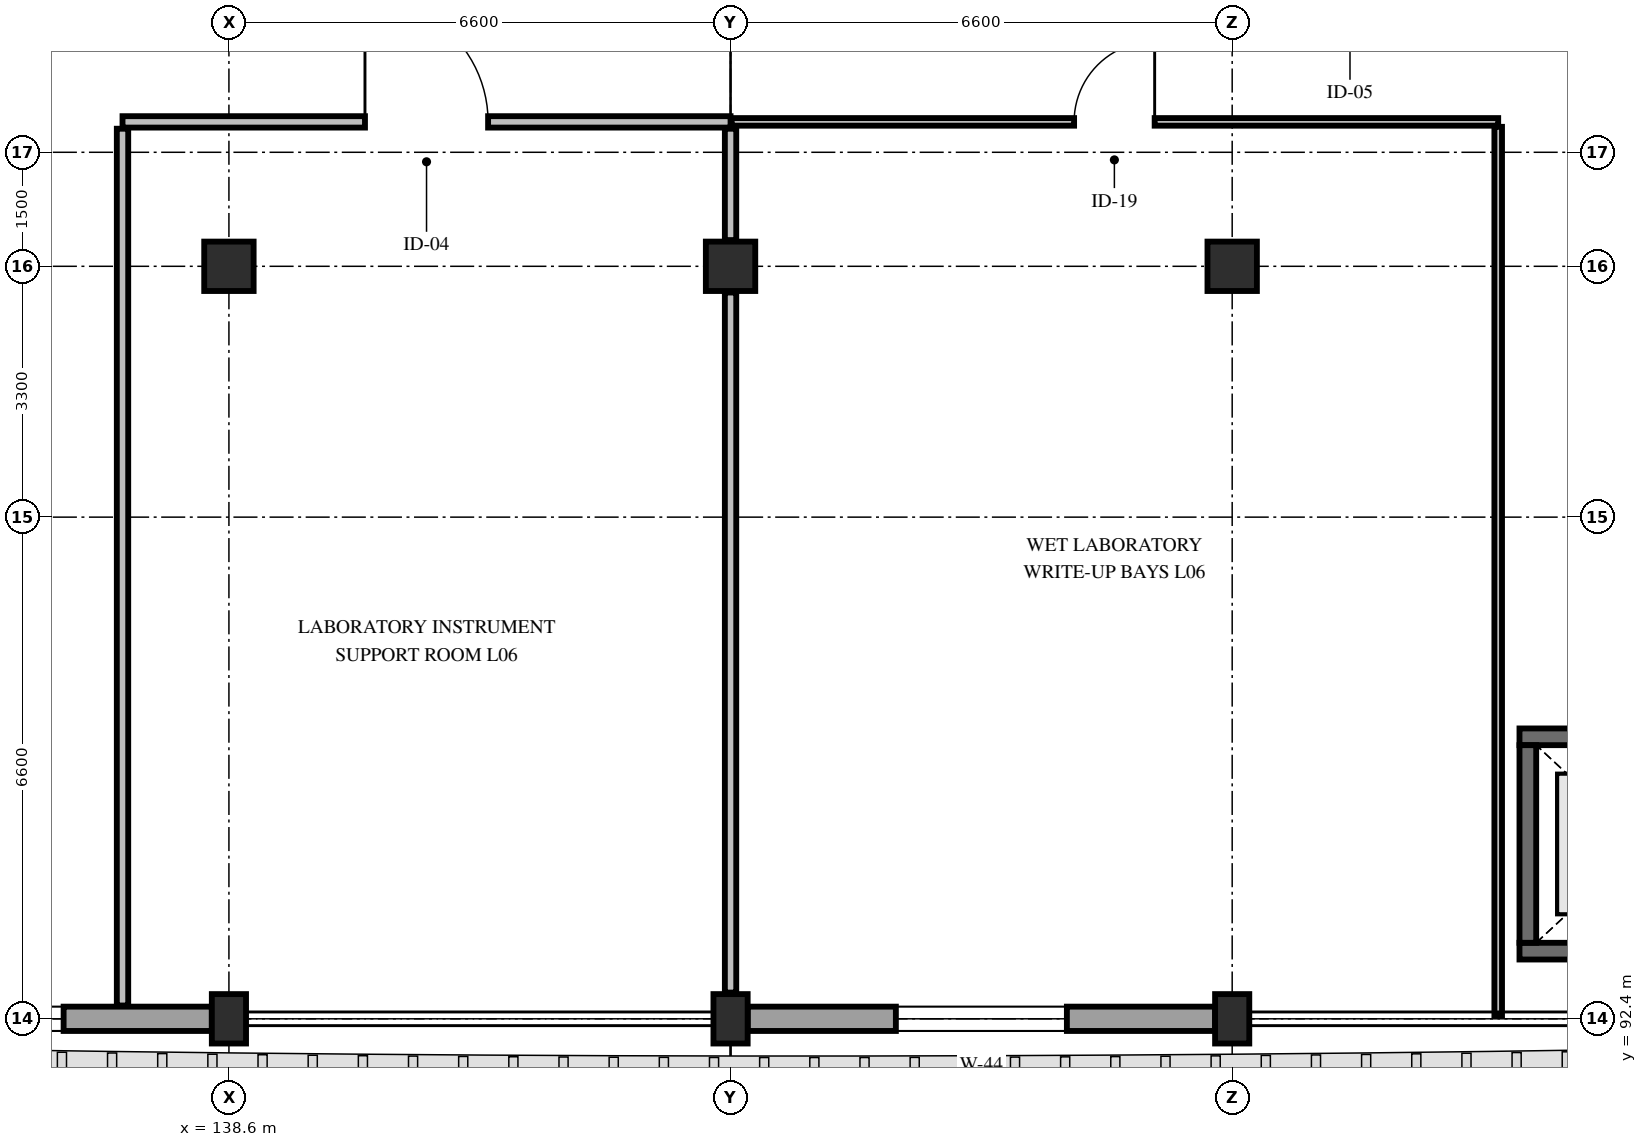
"""IFC4 building model, lengths in metres.
Left out: names, types, materials, properties, quantities, classifications, styles, units other than length and angle.
Written with IfcOpenShell. Run it as: python <this file> out.ifc"""

import sys

from ifc_helpers import new_model, si_unit, direction, frame, frame_2d, origin, origin_2d, place, context, subcontext, project, spatial, rectangle, extrude, element, fill, save


model = new_model("IFC4")
c1 = context("Model", 3, precision=1e-05, world=origin(), true_north=direction((0.0, 1.0)))
c2 = subcontext(c1, "Body", "Model", "MODEL_VIEW")
j1 = project(units=[si_unit("LENGTHUNIT", "METRE"), si_unit("PLANEANGLEUNIT", "RADIAN")], contexts=[c1])
p1 = place(None, origin())
s1 = spatial("IfcSite", under=j1, at=p1, CompositionType="ELEMENT")
p2 = place(p1, origin())
s2 = spatial("IfcBuilding", under=s1, at=p2, CompositionType="ELEMENT")
p3 = place(p2, frame((0.0, 0.0, 29.4)))
s3 = spatial("IfcBuildingStorey", under=s2, at=p3, CompositionType="ELEMENT", Elevation=29.4)
p4 = place(p3, frame((138.6, 92.4, 0.0), z_axis=(0.0, 0.0, 1.0), x_axis=(1.0, 0.0, 0.0)))
e1 = element("IfcColumn", 1, at=p4, inside=s3, PredefinedType="PILASTER", context=c2, shape_type="SweptSolid", body=[
    extrude(rectangle(XDim=0.45, YDim=0.65, at=origin_2d()), origin(), (0.0, 0.0, 1.0), 4.8),
])
p5 = place(p3, frame((138.6, 102.3, 0.0), z_axis=(0.0, 0.0, 1.0), x_axis=(1.0, 0.0, 0.0)))
e2 = element("IfcColumn", 2, at=p5, inside=s3, PredefinedType="COLUMN", context=c2, shape_type="SweptSolid", body=[
    extrude(rectangle(XDim=0.65, YDim=0.65, at=origin_2d()), origin(), (0.0, 0.0, 1.0), 4.8),
])
p6 = place(p3, frame((145.2, 92.4, 0.0), z_axis=(0.0, 0.0, 1.0), x_axis=(1.0, 0.0, 0.0)))
e3 = element("IfcColumn", 3, at=p6, inside=s3, PredefinedType="PILASTER", context=c2, shape_type="SweptSolid", body=[
    extrude(rectangle(XDim=0.45, YDim=0.65, at=origin_2d()), origin(), (0.0, 0.0, 1.0), 4.8),
])
p7 = place(p3, frame((145.2, 102.3, 0.0), z_axis=(0.0, 0.0, 1.0), x_axis=(1.0, 0.0, 0.0)))
e4 = element("IfcColumn", 4, at=p7, inside=s3, PredefinedType="COLUMN", context=c2, shape_type="SweptSolid", body=[
    extrude(rectangle(XDim=0.65, YDim=0.65, at=origin_2d()), origin(), (0.0, 0.0, 1.0), 4.8),
])
p8 = place(p3, frame((151.8, 92.4, 0.0), z_axis=(0.0, 0.0, 1.0), x_axis=(1.0, 0.0, 0.0)))
e5 = element("IfcColumn", 5, at=p8, inside=s3, PredefinedType="PILASTER", context=c2, shape_type="SweptSolid", body=[
    extrude(rectangle(XDim=0.45, YDim=0.65, at=origin_2d()), origin(), (0.0, 0.0, 1.0), 4.8),
])
p9 = place(p3, frame((151.8, 102.3, 0.0), z_axis=(0.0, 0.0, 1.0), x_axis=(1.0, 0.0, 0.0)))
e6 = element("IfcColumn", 6, at=p9, inside=s3, PredefinedType="COLUMN", context=c2, shape_type="SweptSolid", body=[
    extrude(rectangle(XDim=0.65, YDim=0.65, at=origin_2d()), origin(), (0.0, 0.0, 1.0), 4.8),
])
p10 = place(p3, frame((151.575, 92.4, 0.0), z_axis=(0.0, 0.0, 1.0), x_axis=(-1.0, 0.0, 0.0)))
e7 = element("IfcWall", 7, at=p10, inside=s3, PredefinedType="STANDARD", context=c2, shape_type="SweptSolid", body=[
    extrude(rectangle(XDim=6.15, YDim=0.32, at=frame_2d((3.075, 0.0))), origin(), (0.0, 0.0, 1.0), 3.78),
])
p11 = place(p10, frame((1.95, 0.0, 0.85)))
e8 = element("IfcOpeningElement", 8, at=p11, cuts=e7, PredefinedType="OPENING", context=c2, shape_type="SweptSolid", body=[
    extrude(rectangle(XDim=2.25, YDim=2.24, at=frame_2d((1.125, 1.12))), frame((0.0, 0.175, 0.0), z_axis=(0.0, -1.0, 0.0), x_axis=(1.0, 0.0, 0.0)), (0.0, 0.0, 1.0), 0.35),
])
p12 = place(p3, frame((138.375, 92.4, 0.0), z_axis=(0.0, 0.0, 1.0), x_axis=(-1.0, 0.0, 0.0)))
e9 = element("IfcWall", 9, at=p12, inside=s3, PredefinedType="STANDARD", context=c2, shape_type="SweptSolid", body=[
    extrude(rectangle(XDim=6.15, YDim=0.32, at=frame_2d((3.075, 0.0))), origin(), (0.0, 0.0, 1.0), 3.78),
])
p13 = place(p12, frame((1.95, 0.0, 0.85)))
e10 = element("IfcOpeningElement", 10, at=p13, cuts=e9, PredefinedType="OPENING", context=c2, shape_type="SweptSolid", body=[
    extrude(rectangle(XDim=2.25, YDim=2.24, at=frame_2d((1.125, 1.12))), frame((0.0, 0.175, 0.0), z_axis=(0.0, -1.0, 0.0), x_axis=(1.0, 0.0, 0.0)), (0.0, 0.0, 1.0), 0.35),
])
p14 = place(p3, frame((155.58, 93.29, 0.0), z_axis=(0.0, 0.0, 1.0), x_axis=(1.0, 0.0, 0.0)))
e11 = element("IfcWall", 11, at=p14, inside=s3, PredefinedType="SHEAR", context=c2, shape_type="SweptSolid", body=[
    extrude(rectangle(XDim=3.24, YDim=0.22, at=frame_2d((1.62, 0.0))), origin(), (0.0, 0.0, 1.0), 4.48),
])
p15 = place(p3, frame((155.58, 96.11, 0.0), z_axis=(0.0, 0.0, 1.0), x_axis=(1.0, 0.0, 0.0)))
e12 = element("IfcWall", 12, at=p15, inside=s3, PredefinedType="SHEAR", context=c2, shape_type="SweptSolid", body=[
    extrude(rectangle(XDim=3.24, YDim=0.22, at=frame_2d((1.62, 0.0))), origin(), (0.0, 0.0, 1.0), 4.48),
])
p16 = place(p15, frame((0.92, 0.0, 0.0)))
e13 = element("IfcOpeningElement", 13, at=p16, cuts=e12, PredefinedType="OPENING", context=c2, shape_type="SweptSolid", body=[
    extrude(rectangle(XDim=1.4, YDim=2.3, at=frame_2d((0.7, 1.15))), frame((0.0, 0.125, 0.0), z_axis=(0.0, -1.0, 0.0), x_axis=(1.0, 0.0, 0.0)), (0.0, 0.0, 1.0), 0.25),
])
p17 = place(p3, frame((155.69, 93.4, 0.0), z_axis=(0.0, 0.0, 1.0), x_axis=(0.0, 1.0, 0.0)))
e14 = element("IfcWall", 14, at=p17, inside=s3, PredefinedType="SHEAR", context=c2, shape_type="SweptSolid", body=[
    extrude(rectangle(XDim=2.6, YDim=0.22, at=frame_2d((1.3, 0.0))), origin(), (0.0, 0.0, 1.0), 4.48),
])
p18 = place(p3, frame((137.2, 104.2, 0.0), z_axis=(0.0, 0.0, 1.0), x_axis=(1.0, 0.0, 0.0)))
e15 = element("IfcWall", 15, at=p18, inside=s3, PredefinedType="PARTITIONING", context=c2, shape_type="SweptSolid", body=[
    extrude(rectangle(XDim=8.0, YDim=0.15, at=frame_2d((4.0, 0.0))), origin(), (0.0, 0.0, 1.0), 3.78),
])
p19 = place(p18, frame((3.19, 0.0, 0.0)))
e16 = element("IfcOpeningElement", 16, at=p19, cuts=e15, PredefinedType="OPENING", context=c2, shape_type="SweptSolid", body=[
    extrude(rectangle(XDim=1.62, YDim=2.3, at=frame_2d((0.81, 1.15))), frame((0.0, 0.09, 0.0), z_axis=(0.0, -1.0, 0.0), x_axis=(1.0, 0.0, 0.0)), (0.0, 0.0, 1.0), 0.18),
])
p20 = place(p3, frame((137.2, 92.575, 0.0), z_axis=(0.0, 0.0, 1.0), x_axis=(0.0, 1.0, 0.0)))
e17 = element("IfcWall", 17, at=p20, inside=s3, PredefinedType="PARTITIONING", context=c2, shape_type="SweptSolid", body=[
    extrude(rectangle(XDim=11.535, YDim=0.15, at=frame_2d((5.768, 0.0))), origin(), (0.0, 0.0, 1.0), 3.93),
])
p21 = place(p3, frame((145.2, 92.745, 0.0), z_axis=(0.0, 0.0, 1.0), x_axis=(0.0, 1.0, 0.0)))
e18 = element("IfcWall", 18, at=p21, inside=s3, PredefinedType="PARTITIONING", context=c2, shape_type="SweptSolid", body=[
    extrude(rectangle(XDim=9.21, YDim=0.15, at=frame_2d((4.605, 0.0))), origin(), (0.0, 0.0, 1.0), 3.78),
])
p22 = place(p3, frame((145.2, 102.645, 0.0), z_axis=(0.0, 0.0, 1.0), x_axis=(0.0, 1.0, 0.0)))
e19 = element("IfcWall", 19, at=p22, inside=s3, PredefinedType="PARTITIONING", context=c2, shape_type="SweptSolid", body=[
    extrude(rectangle(XDim=1.465, YDim=0.15, at=frame_2d((0.732, 0.0))), origin(), (0.0, 0.0, 1.0), 3.78),
])
p23 = place(p3, frame((145.215, 104.2, 0.0), z_axis=(0.0, 0.0, 1.0), x_axis=(1.0, 0.0, 0.0)))
e20 = element("IfcWall", 20, at=p23, inside=s3, PredefinedType="PARTITIONING", context=c2, shape_type="SweptSolid", body=[
    extrude(rectangle(XDim=10.085, YDim=0.1, at=frame_2d((5.042, 0.0))), origin(), (0.0, 0.0, 1.0), 3.78),
])
p24 = place(p23, frame((4.505, 0.0, 0.0)))
e21 = element("IfcOpeningElement", 21, at=p24, cuts=e20, PredefinedType="OPENING", context=c2, shape_type="SweptSolid", body=[
    extrude(rectangle(XDim=1.06, YDim=2.2, at=frame_2d((0.53, 1.1))), frame((0.0, 0.065, 0.0), z_axis=(0.0, -1.0, 0.0), x_axis=(1.0, 0.0, 0.0)), (0.0, 0.0, 1.0), 0.13),
])
p25 = place(p3, frame((155.3, 92.44, 0.0), z_axis=(0.0, 0.0, 1.0), x_axis=(0.0, 1.0, 0.0)))
e22 = element("IfcWall", 22, at=p25, inside=s3, PredefinedType="PARTITIONING", context=c2, shape_type="SweptSolid", body=[
    extrude(rectangle(XDim=11.695, YDim=0.1, at=frame_2d((5.848, 0.0))), origin(), (0.0, 0.0, 1.0), 3.93),
])
p26 = place(p11, origin())
e23 = element("IfcWindow", 23, at=p26, inside=s3, PartitioningType="DOUBLE_PANEL_VERTICAL", PredefinedType="WINDOW", context=c2, shape_type="SweptSolid", body=[
    extrude(rectangle(XDim=2.25, YDim=2.24, at=frame_2d((1.125, 1.12))), frame((0.0, 0.03, 0.0), z_axis=(0.0, -1.0, 0.0), x_axis=(1.0, 0.0, 0.0)), (0.0, 0.0, 1.0), 0.06),
])
fill(e8, e23)
p27 = place(p13, origin())
e24 = element("IfcWindow", 24, at=p27, inside=s3, PartitioningType="DOUBLE_PANEL_VERTICAL", PredefinedType="WINDOW", context=c2, shape_type="SweptSolid", body=[
    extrude(rectangle(XDim=2.25, YDim=2.24, at=frame_2d((1.125, 1.12))), frame((0.0, 0.03, 0.0), z_axis=(0.0, -1.0, 0.0), x_axis=(1.0, 0.0, 0.0)), (0.0, 0.0, 1.0), 0.06),
])
fill(e10, e24)
p28 = place(p19, origin())
e25 = element("IfcDoor", 25, at=p28, inside=s3, OperationType="SINGLE_SWING_LEFT", PredefinedType="DOOR", context=c2, shape_type="SweptSolid", body=[
    extrude(rectangle(XDim=1.62, YDim=2.3, at=frame_2d((0.81, 1.15))), frame((0.0, 0.025, 0.0), z_axis=(0.0, -1.0, 0.0), x_axis=(1.0, 0.0, 0.0)), (0.0, 0.0, 1.0), 0.05),
])
fill(e16, e25)
p29 = place(p24, origin())
e26 = element("IfcDoor", 26, at=p29, inside=s3, OperationType="SINGLE_SWING_RIGHT", PredefinedType="DOOR", context=c2, shape_type="SweptSolid", body=[
    extrude(rectangle(XDim=1.06, YDim=2.2, at=frame_2d((0.53, 1.1))), frame((0.0, 0.025, 0.0), z_axis=(0.0, -1.0, 0.0), x_axis=(1.0, 0.0, 0.0)), (0.0, 0.0, 1.0), 0.05),
])
fill(e21, e26)
save(model, sys.argv[1])
